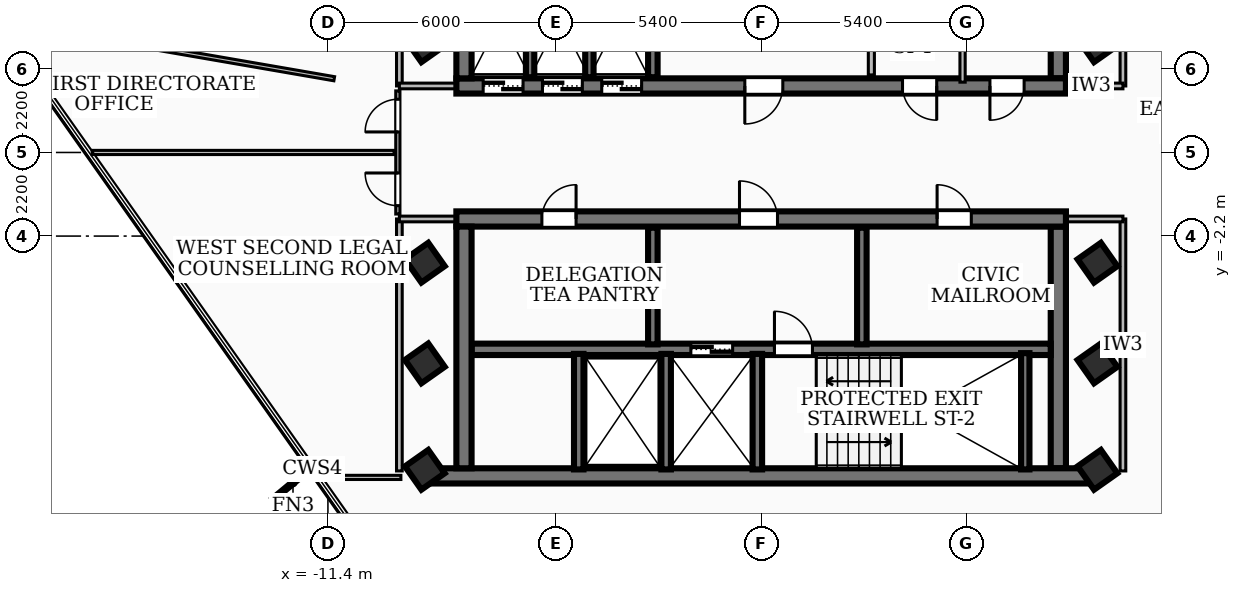
"""IFC4 building model, lengths in metres.
Left out: names, types, materials, properties, quantities, classifications, styles, units other than length and angle.
Written with IfcOpenShell. Run it as: python <this file> out.ifc"""

import sys

from ifc_helpers import new_model, si_unit, direction, frame, frame_2d, origin, origin_2d, place, context, subcontext, project, spatial, rectangle, extrude, element, fill, save


model = new_model("IFC4")
c1 = context("Model", 3, precision=1e-05, world=origin(), true_north=direction((0.0, 1.0)))
c2 = subcontext(c1, "Body", "Model", "MODEL_VIEW")
j1 = project(units=[si_unit("LENGTHUNIT", "METRE"), si_unit("PLANEANGLEUNIT", "RADIAN")], contexts=[c1])
p1 = place(None, origin())
s1 = spatial("IfcSite", under=j1, at=p1, CompositionType="ELEMENT")
p2 = place(p1, origin())
s2 = spatial("IfcBuilding", under=s1, at=p2, CompositionType="ELEMENT")
p3 = place(p2, frame((0.0, 0.0, 222.3)))
s3 = spatial("IfcBuildingStorey", under=s2, at=p3, CompositionType="ELEMENT", Elevation=222.3)
p4 = place(p3, frame((8.02, 1.75, 0.0), z_axis=(0.0, 0.0, 1.0), x_axis=(-1.0, 0.0, 0.0)))
e1 = element("IfcWall", 1, at=p4, inside=s3, PredefinedType="SHEAR", context=c2, shape_type="SweptSolid", body=[
    extrude(rectangle(XDim=16.04, YDim=0.4, at=frame_2d((8.02, 0.0))), origin(), (0.0, 0.0, 1.0), 3.14),
])
p5 = place(p4, frame((7.45, 0.0, 0.0)))
e2 = element("IfcOpeningElement", 2, at=p5, cuts=e1, PredefinedType="OPENING", context=c2, shape_type="SweptSolid", body=[
    extrude(rectangle(XDim=1.0, YDim=2.1, at=frame_2d((0.5, 1.05))), frame((0.0, 0.21, 0.0), z_axis=(0.0, -1.0, 0.0), x_axis=(1.0, 0.0, 0.0)), (0.0, 0.0, 1.0), 0.42),
])
p6 = place(p4, frame((14.285, 0.0, 0.0)))
e3 = element("IfcOpeningElement", 3, at=p6, cuts=e1, PredefinedType="OPENING", context=c2, shape_type="SweptSolid", body=[
    extrude(rectangle(XDim=1.05, YDim=2.15, at=frame_2d((0.525, 1.075))), frame((0.0, 0.21, 0.0), z_axis=(0.0, -1.0, 0.0), x_axis=(1.0, 0.0, 0.0)), (0.0, 0.0, 1.0), 0.42),
])
p7 = place(p4, frame((12.725, 0.0, 0.0)))
e4 = element("IfcOpeningElement", 4, at=p7, cuts=e1, PredefinedType="OPENING", context=c2, shape_type="SweptSolid", body=[
    extrude(rectangle(XDim=1.05, YDim=2.15, at=frame_2d((0.525, 1.075))), frame((0.0, 0.21, 0.0), z_axis=(0.0, -1.0, 0.0), x_axis=(1.0, 0.0, 0.0)), (0.0, 0.0, 1.0), 0.42),
])
p8 = place(p4, frame((11.165, 0.0, 0.0)))
e5 = element("IfcOpeningElement", 5, at=p8, cuts=e1, PredefinedType="OPENING", context=c2, shape_type="SweptSolid", body=[
    extrude(rectangle(XDim=1.05, YDim=2.15, at=frame_2d((0.525, 1.075))), frame((0.0, 0.21, 0.0), z_axis=(0.0, -1.0, 0.0), x_axis=(1.0, 0.0, 0.0)), (0.0, 0.0, 1.0), 0.42),
])
p9 = place(p4, frame((3.4, 0.0, 0.0)))
e6 = element("IfcOpeningElement", 6, at=p9, cuts=e1, PredefinedType="OPENING", context=c2, shape_type="SweptSolid", body=[
    extrude(rectangle(XDim=0.9, YDim=2.06, at=frame_2d((0.45, 1.03))), frame((0.0, 0.21, 0.0), z_axis=(0.0, -1.0, 0.0), x_axis=(1.0, 0.0, 0.0)), (0.0, 0.0, 1.0), 0.42),
])
p10 = place(p4, frame((1.1, 0.0, 0.0)))
e7 = element("IfcOpeningElement", 7, at=p10, cuts=e1, PredefinedType="OPENING", context=c2, shape_type="SweptSolid", body=[
    extrude(rectangle(XDim=0.9, YDim=2.06, at=frame_2d((0.45, 1.03))), frame((0.0, 0.21, 0.0), z_axis=(0.0, -1.0, 0.0), x_axis=(1.0, 0.0, 0.0)), (0.0, 0.0, 1.0), 0.42),
])
for number, where, z_axis, x_axis in (
    (8, (-7.82, 1.95, 0.0), (0.0, 0.0, 1.0), (0.0, 1.0, 0.0)),
    (9, (7.82, 8.31, 0.0), (0.0, 0.0, 1.0), (0.0, -1.0, 0.0)),
):
    element("IfcWall", number, at=place(p3, frame(where, z_axis=z_axis, x_axis=x_axis)), inside=s3, PredefinedType="SHEAR", context=c2, shape_type="SweptSolid", body=[
        extrude(rectangle(XDim=6.36, YDim=0.4, at=frame_2d((3.18, 0.0))), origin(), (0.0, 0.0, 1.0), 3.14),
    ])
p11 = place(p3, frame((8.78, -8.51, 0.0), z_axis=(0.0, 0.0, 1.0), x_axis=(-1.0, 0.0, 0.0)))
e10 = element("IfcWall", 10, at=p11, inside=s3, PredefinedType="SHEAR", context=c2, shape_type="SweptSolid", body=[
    extrude(rectangle(XDim=17.56, YDim=0.4, at=frame_2d((8.78, 0.0))), origin(), (0.0, 0.0, 1.0), 3.14),
])
p12 = place(p3, frame((-8.02, -1.75, 0.0), z_axis=(0.0, 0.0, 1.0), x_axis=(1.0, 0.0, 0.0)))
e11 = element("IfcWall", 11, at=p12, inside=s3, PredefinedType="SHEAR", context=c2, shape_type="SweptSolid", body=[
    extrude(rectangle(XDim=16.04, YDim=0.4, at=frame_2d((8.02, 0.0))), origin(), (0.0, 0.0, 1.0), 3.14),
])
p13 = place(p12, frame((7.45, 0.0, 0.0)))
e12 = element("IfcOpeningElement", 12, at=p13, cuts=e11, PredefinedType="OPENING", context=c2, shape_type="SweptSolid", body=[
    extrude(rectangle(XDim=1.0, YDim=2.1, at=frame_2d((0.5, 1.05))), frame((0.0, 0.21, 0.0), z_axis=(0.0, -1.0, 0.0), x_axis=(1.0, 0.0, 0.0)), (0.0, 0.0, 1.0), 0.42),
])
p14 = place(p12, frame((12.65, 0.0, 0.0)))
e13 = element("IfcOpeningElement", 13, at=p14, cuts=e11, PredefinedType="OPENING", context=c2, shape_type="SweptSolid", body=[
    extrude(rectangle(XDim=0.9, YDim=2.06, at=frame_2d((0.45, 1.03))), frame((0.0, 0.21, 0.0), z_axis=(0.0, -1.0, 0.0), x_axis=(1.0, 0.0, 0.0)), (0.0, 0.0, 1.0), 0.42),
])
p15 = place(p12, frame((2.25, 0.0, 0.0)))
e14 = element("IfcOpeningElement", 14, at=p15, cuts=e11, PredefinedType="OPENING", context=c2, shape_type="SweptSolid", body=[
    extrude(rectangle(XDim=0.9, YDim=2.06, at=frame_2d((0.45, 1.03))), frame((0.0, 0.21, 0.0), z_axis=(0.0, -1.0, 0.0), x_axis=(1.0, 0.0, 0.0)), (0.0, 0.0, 1.0), 0.42),
])
for number, where, z_axis, x_axis in (
    (15, (-7.82, -8.31, 0.0), (0.0, 0.0, 1.0), (0.0, 1.0, 0.0)),
    (16, (7.82, -1.95, 0.0), (0.0, 0.0, 1.0), (0.0, -1.0, 0.0)),
):
    element("IfcWall", number, at=place(p3, frame(where, z_axis=z_axis, x_axis=x_axis)), inside=s3, PredefinedType="SHEAR", context=c2, shape_type="SweptSolid", body=[
        extrude(rectangle(XDim=6.36, YDim=0.4, at=frame_2d((3.18, 0.0))), origin(), (0.0, 0.0, 1.0), 3.14),
    ])
p16 = place(p3, frame((-7.62, -5.18, 0.0), z_axis=(0.0, 0.0, 1.0), x_axis=(1.0, 0.0, 0.0)))
e17 = element("IfcWall", 17, at=p16, inside=s3, PredefinedType="SOLIDWALL", context=c2, shape_type="SweptSolid", body=[
    extrude(rectangle(XDim=15.24, YDim=0.3, at=frame_2d((7.62, 0.0))), origin(), (0.0, 0.0, 1.0), 3.14),
])
p17 = place(p16, frame((5.77, 0.0, 0.0)))
e18 = element("IfcOpeningElement", 18, at=p17, cuts=e17, PredefinedType="OPENING", context=c2, shape_type="SweptSolid", body=[
    extrude(rectangle(XDim=1.1, YDim=2.15, at=frame_2d((0.55, 1.075))), frame((0.0, 0.16, 0.0), z_axis=(0.0, -1.0, 0.0), x_axis=(1.0, 0.0, 0.0)), (0.0, 0.0, 1.0), 0.32),
])
p18 = place(p16, frame((7.97, 0.0, 0.0)))
e19 = element("IfcOpeningElement", 19, at=p18, cuts=e17, PredefinedType="OPENING", context=c2, shape_type="SweptSolid", body=[
    extrude(rectangle(XDim=1.0, YDim=2.1, at=frame_2d((0.5, 1.05))), frame((0.0, 0.16, 0.0), z_axis=(0.0, -1.0, 0.0), x_axis=(1.0, 0.0, 0.0)), (0.0, 0.0, 1.0), 0.32),
])
p19 = place(p3, frame((6.95, -8.34, 0.0), z_axis=(0.0, 0.0, 1.0), x_axis=(0.0, 1.0, 0.0)))
e20 = element("IfcWall", 20, at=p19, inside=s3, PredefinedType="SOLIDWALL", context=c2, shape_type="SweptSolid", body=[
    extrude(rectangle(XDim=3.06, YDim=0.22, at=frame_2d((1.53, 0.0))), origin(), (0.0, 0.0, 1.0), 3.14),
])
p20 = place(p3, frame((-2.85, 1.98, 0.0), z_axis=(0.0, 0.0, 1.0), x_axis=(0.0, 1.0, 0.0)))
e21 = element("IfcWall", 21, at=p20, inside=s3, PredefinedType="SOLIDWALL", context=c2, shape_type="SweptSolid", body=[
    extrude(rectangle(XDim=3.07, YDim=0.25, at=frame_2d((1.535, 0.0))), origin(), (0.0, 0.0, 1.0), 3.14),
])
for number, where, z_axis, x_axis in (
    (22, (-0.1, -8.34, 0.0), (0.0, 0.0, 1.0), (0.0, 1.0, 0.0)),
    (23, (-2.5, -8.34, 0.0), (0.0, 0.0, 1.0), (0.0, 1.0, 0.0)),
    (24, (-4.8, -8.34, 0.0), (0.0, 0.0, 1.0), (0.0, 1.0, 0.0)),
):
    element("IfcWall", number, at=place(p3, frame(where, z_axis=z_axis, x_axis=x_axis)), inside=s3, PredefinedType="SOLIDWALL", context=c2, shape_type="SweptSolid", body=[
        extrude(rectangle(XDim=3.04, YDim=0.25, at=frame_2d((1.52, 0.0))), origin(), (0.0, 0.0, 1.0), 3.14),
    ])
for number, where, z_axis, x_axis in (
    (25, (-2.85, -5.05, 0.0), (0.0, 0.0, 1.0), (0.0, 1.0, 0.0)),
    (26, (2.65, -5.05, 0.0), (0.0, 0.0, 1.0), (0.0, 1.0, 0.0)),
):
    element("IfcWall", number, at=place(p3, frame(where, z_axis=z_axis, x_axis=x_axis)), inside=s3, PredefinedType="SOLIDWALL", context=c2, shape_type="SweptSolid", body=[
        extrude(rectangle(XDim=3.07, YDim=0.25, at=frame_2d((1.535, 0.0))), origin(), (0.0, 0.0, 1.0), 3.14),
    ])
for number, where, z_axis, x_axis in (
    (27, (-6.08, 1.98, 0.0), (0.0, 0.0, 1.0), (0.0, 1.0, 0.0)),
    (28, (-4.52, 1.98, 0.0), (0.0, 0.0, 1.0), (0.0, 1.0, 0.0)),
):
    element("IfcWall", number, at=place(p3, frame(where, z_axis=z_axis, x_axis=x_axis)), inside=s3, PredefinedType="SOLIDWALL", context=c2, shape_type="SweptSolid", body=[
        extrude(rectangle(XDim=3.07, YDim=0.22, at=frame_2d((1.535, 0.0))), origin(), (0.0, 0.0, 1.0), 3.14),
    ])
for number, where, z_axis, x_axis in (
    (29, (-8.85, -5.55, 0.0), (0.0, 0.0, 1.0), (0.817, 0.576, 0.0)),
    (30, (-8.85, -2.9, 0.0), (0.0, 0.0, 1.0), (0.817, 0.576, 0.0)),
    (31, (-8.85, 2.9, 0.0), (0.0, 0.0, 1.0), (0.817, 0.576, 0.0)),
    (32, (8.85, -5.55, 0.0), (0.0, 0.0, 1.0), (0.817, 0.576, 0.0)),
    (33, (8.85, -2.9, 0.0), (0.0, 0.0, 1.0), (0.817, 0.576, 0.0)),
    (34, (8.85, 2.9, 0.0), (0.0, 0.0, 1.0), (0.817, 0.576, 0.0)),
    (35, (8.85, -8.35, 0.0), (0.0, 0.0, 1.0), (0.817, 0.576, 0.0)),
    (36, (-8.85, -8.35, 0.0), (0.0, 0.0, 1.0), (0.817, 0.576, 0.0)),
):
    element("IfcColumn", number, at=place(p3, frame(where, z_axis=z_axis, x_axis=x_axis)), inside=s3, PredefinedType="COLUMN", context=c2, shape_type="SweptSolid", body=[
        extrude(rectangle(XDim=0.75, YDim=0.75, at=origin_2d()), origin(), (0.0, 0.0, 1.0), 3.42),
    ])
p21 = place(p3, frame((2.9, 2.04, 0.0), z_axis=(0.0, 0.0, 1.0), x_axis=(0.0, 1.0, 0.0)))
e37 = element("IfcWall", 37, at=p21, inside=s3, PredefinedType="PARTITIONING", context=c2, shape_type="SweptSolid", body=[
    extrude(rectangle(XDim=2.94, YDim=0.16, at=frame_2d((1.47, 0.0))), origin(), (0.0, 0.0, 1.0), 2.37),
])
p22 = place(p21, frame((1.82, 0.0, 0.0)))
e38 = element("IfcOpeningElement", 38, at=p22, cuts=e37, PredefinedType="OPENING", context=c2, shape_type="SweptSolid", body=[
    extrude(rectangle(XDim=0.9, YDim=2.06, at=frame_2d((0.45, 1.03))), frame((0.0, 0.09, 0.0), z_axis=(0.0, -1.0, 0.0), x_axis=(1.0, 0.0, 0.0)), (0.0, 0.0, 1.0), 0.18),
])
p23 = place(p3, frame((5.3, 1.85, 0.0), z_axis=(0.0, 0.0, 1.0), x_axis=(0.0, 1.0, 0.0)))
e39 = element("IfcWall", 39, at=p23, inside=s3, PredefinedType="PARTITIONING", context=c2, shape_type="SweptSolid", body=[
    extrude(rectangle(XDim=1.89, YDim=0.138, at=frame_2d((0.945, 0.0))), origin(), (0.0, 0.0, 1.0), 2.37),
])
p24 = place(p3, frame((-9.52, 1.75, 0.0), z_axis=(0.0, 0.0, 1.0), x_axis=(0.0, 1.0, 0.0)))
e40 = element("IfcWall", 40, at=p24, inside=s3, PredefinedType="PARTITIONING", context=c2, shape_type="SweptSolid", body=[
    extrude(rectangle(XDim=6.63, YDim=0.15, at=frame_2d((3.315, 0.0))), origin(), (0.0, 0.0, 1.0), 3.14),
])
p25 = place(p3, frame((-7.85, 1.75, 0.0), z_axis=(0.0, 0.0, 1.0), x_axis=(-1.0, 0.0, 0.0)))
e41 = element("IfcWall", 41, at=p25, inside=s3, PredefinedType="PARTITIONING", context=c2, shape_type="SweptSolid", body=[
    extrude(rectangle(XDim=1.67, YDim=0.15, at=frame_2d((0.835, 0.0))), origin(), (0.0, 0.0, 1.0), 2.37),
])
p26 = place(p3, frame((-9.52, -8.38, 0.0), z_axis=(0.0, 0.0, 1.0), x_axis=(0.0, 1.0, 0.0)))
e42 = element("IfcWall", 42, at=p26, inside=s3, PredefinedType="PARTITIONING", context=c2, shape_type="SweptSolid", body=[
    extrude(rectangle(XDim=6.63, YDim=0.15, at=frame_2d((3.315, 0.0))), origin(), (0.0, 0.0, 1.0), 3.14),
])
p27 = place(p3, frame((-7.85, -1.75, 0.0), z_axis=(0.0, 0.0, 1.0), x_axis=(-1.0, 0.0, 0.0)))
e43 = element("IfcWall", 43, at=p27, inside=s3, PredefinedType="PARTITIONING", context=c2, shape_type="SweptSolid", body=[
    extrude(rectangle(XDim=1.67, YDim=0.15, at=frame_2d((0.835, 0.0))), origin(), (0.0, 0.0, 1.0), 2.37),
])
p28 = place(p3, frame((9.52, 1.75, 0.0), z_axis=(0.0, 0.0, 1.0), x_axis=(0.0, 1.0, 0.0)))
e44 = element("IfcWall", 44, at=p28, inside=s3, PredefinedType="PARTITIONING", context=c2, shape_type="SweptSolid", body=[
    extrude(rectangle(XDim=6.63, YDim=0.15, at=frame_2d((3.315, 0.0))), origin(), (0.0, 0.0, 1.0), 2.51),
])
p29 = place(p3, frame((7.85, 1.75, 0.0), z_axis=(0.0, 0.0, 1.0), x_axis=(1.0, 0.0, 0.0)))
e45 = element("IfcWall", 45, at=p29, inside=s3, PredefinedType="PARTITIONING", context=c2, shape_type="SweptSolid", body=[
    extrude(rectangle(XDim=1.67, YDim=0.15, at=frame_2d((0.835, 0.0))), origin(), (0.0, 0.0, 1.0), 2.37),
])
p30 = place(p3, frame((9.52, -8.38, 0.0), z_axis=(0.0, 0.0, 1.0), x_axis=(0.0, 1.0, 0.0)))
e46 = element("IfcWall", 46, at=p30, inside=s3, PredefinedType="PARTITIONING", context=c2, shape_type="SweptSolid", body=[
    extrude(rectangle(XDim=6.63, YDim=0.15, at=frame_2d((3.315, 0.0))), origin(), (0.0, 0.0, 1.0), 3.14),
])
p31 = place(p3, frame((7.85, -1.75, 0.0), z_axis=(0.0, 0.0, 1.0), x_axis=(1.0, 0.0, 0.0)))
e47 = element("IfcWall", 47, at=p31, inside=s3, PredefinedType="PARTITIONING", context=c2, shape_type="SweptSolid", body=[
    extrude(rectangle(XDim=1.67, YDim=0.15, at=frame_2d((0.835, 0.0))), origin(), (0.0, 0.0, 1.0), 2.37),
])
p32 = place(p3, frame((-17.604, 0.0, 0.0), z_axis=(0.0, 0.0, 1.0), x_axis=(1.0, 0.0, 0.0)))
e48 = element("IfcWall", 48, at=p32, inside=s3, PredefinedType="PARTITIONING", context=c2, shape_type="SweptSolid", body=[
    extrude(rectangle(XDim=7.944, YDim=0.11, at=frame_2d((3.972, 0.0))), origin(), (0.0, 0.0, 1.0), 3.14),
])
p33 = place(p3, frame((-11.573, -8.55, 0.0), z_axis=(0.0, 0.0, 1.0), x_axis=(1.0, 0.0, 0.0)))
e49 = element("IfcWall", 49, at=p33, inside=s3, PredefinedType="PARTITIONING", context=c2, shape_type="SweptSolid", body=[
    extrude(rectangle(XDim=2.093, YDim=0.11, at=frame_2d((1.046, 0.0))), origin(), (0.0, 0.0, 1.0), 3.14),
])
p34 = place(p3, frame((-9.56, -1.62, 0.0), z_axis=(0.0, 0.0, 1.0), x_axis=(0.0, 1.0, 0.0)))
e50 = element("IfcWall", 50, at=p34, inside=s3, PredefinedType="PARTITIONING", context=c2, shape_type="SweptSolid", body=[
    extrude(rectangle(XDim=3.24, YDim=0.11, at=frame_2d((1.62, 0.0))), origin(), (0.0, 0.0, 1.0), 3.14),
])
p35 = place(p34, frame((0.22, 0.0, 0.0)))
e51 = element("IfcOpeningElement", 51, at=p35, cuts=e50, PredefinedType="OPENING", context=c2, shape_type="SweptSolid", body=[
    extrude(rectangle(XDim=0.86, YDim=2.04, at=frame_2d((0.43, 1.02))), frame((0.0, 0.065, 0.0), z_axis=(0.0, -1.0, 0.0), x_axis=(1.0, 0.0, 0.0)), (0.0, 0.0, 1.0), 0.13),
])
p36 = place(p34, frame((2.16, 0.0, 0.0)))
e52 = element("IfcOpeningElement", 52, at=p36, cuts=e50, PredefinedType="OPENING", context=c2, shape_type="SweptSolid", body=[
    extrude(rectangle(XDim=0.86, YDim=2.04, at=frame_2d((0.43, 1.02))), frame((0.0, 0.065, 0.0), z_axis=(0.0, -1.0, 0.0), x_axis=(1.0, 0.0, 0.0)), (0.0, 0.0, 1.0), 0.13),
])
p37 = place(p3, frame((-11.234, 1.94, 0.0), z_axis=(0.0, 0.0, 1.0), x_axis=(-0.985400402951, 0.170252887973, 0.0)))
e53 = element("IfcWall", 53, at=p37, inside=s3, PredefinedType="PARTITIONING", context=c2, shape_type="SweptSolid", body=[
    extrude(rectangle(XDim=8.294, YDim=0.11, at=frame_2d((4.147, 0.0))), origin(), (0.0, 0.0, 1.0), 3.14),
])
p38 = place(p3, frame((16.752, -5.671, 0.0), z_axis=(0.0, 0.0, 1.0), x_axis=(-0.81715881447, -0.576412588285, 0.0)))
e54 = element("IfcWall", 54, at=p38, inside=s3, PredefinedType="PARTITIONING", context=c2, shape_type="SweptSolid", body=[
    extrude(rectangle(XDim=20.44, YDim=0.11, at=frame_2d((10.22, 0.0))), origin(), (0.0, 0.0, 1.0), 2.51),
])
p39 = place(p38, frame((9.82, 0.0, 0.0)))
e55 = element("IfcOpeningElement", 55, at=p39, cuts=e54, PredefinedType="OPENING", context=c2, shape_type="SweptSolid", body=[
    extrude(rectangle(XDim=1.2, YDim=2.1, at=frame_2d((0.6, 1.05))), frame((0.0, 0.065, 0.0), z_axis=(0.0, -1.0, 0.0), x_axis=(1.0, 0.0, 0.0)), (0.0, 0.0, 1.0), 0.13),
])
p40 = place(p3, frame((3.766, -16.85, 0.0), z_axis=(0.0, 0.0, 1.0), x_axis=(0.817131323803, 0.576451558815, 0.0)))
e56 = element("IfcWall", 56, at=p40, inside=s3, PredefinedType="PARTITIONING", context=c2, shape_type="SweptSolid", body=[
    extrude(rectangle(XDim=12.87, YDim=0.11, at=frame_2d((6.435, 0.0))), origin(), (0.0, 0.0, 1.0), 2.51),
])
p41 = place(p40, frame((6.185, 0.0, 0.0)))
e57 = element("IfcOpeningElement", 57, at=p41, cuts=e56, PredefinedType="OPENING", context=c2, shape_type="SweptSolid", body=[
    extrude(rectangle(XDim=0.86, YDim=2.04, at=frame_2d((0.43, 1.02))), frame((0.0, 0.065, 0.0), z_axis=(0.0, -1.0, 0.0), x_axis=(1.0, 0.0, 0.0)), (0.0, 0.0, 1.0), 0.13),
])
p42 = place(p40, frame((7.625, 0.0, 0.0)))
e58 = element("IfcOpeningElement", 58, at=p42, cuts=e56, PredefinedType="OPENING", context=c2, shape_type="SweptSolid", body=[
    extrude(rectangle(XDim=0.86, YDim=2.04, at=frame_2d((0.43, 1.02))), frame((0.0, 0.065, 0.0), z_axis=(0.0, -1.0, 0.0), x_axis=(1.0, 0.0, 0.0)), (0.0, 0.0, 1.0), 0.13),
])
p43 = place(p5, origin())
e59 = element("IfcDoor", 59, at=p43, inside=s3, OperationType="SINGLE_SWING_RIGHT", PredefinedType="DOOR", context=c2, shape_type="SweptSolid", body=[
    extrude(rectangle(XDim=1.0, YDim=2.1, at=frame_2d((0.5, 1.05))), frame((0.0, 0.025, 0.0), z_axis=(0.0, -1.0, 0.0), x_axis=(1.0, 0.0, 0.0)), (0.0, 0.0, 1.0), 0.05),
])
fill(e2, e59)
p44 = place(p13, origin())
e60 = element("IfcDoor", 60, at=p44, inside=s3, OperationType="SINGLE_SWING_LEFT", PredefinedType="DOOR", context=c2, shape_type="SweptSolid", body=[
    extrude(rectangle(XDim=1.0, YDim=2.1, at=frame_2d((0.5, 1.05))), frame((0.0, 0.025, 0.0), z_axis=(0.0, -1.0, 0.0), x_axis=(1.0, 0.0, 0.0)), (0.0, 0.0, 1.0), 0.05),
])
fill(e12, e60)
p45 = place(p17, origin())
e61 = element("IfcDoor", 61, at=p45, inside=s3, OperationType="DOUBLE_DOOR_SLIDING", PredefinedType="DOOR", context=c2, shape_type="SweptSolid", body=[
    extrude(rectangle(XDim=1.1, YDim=2.15, at=frame_2d((0.55, 1.075))), frame((0.0, 0.025, 0.0), z_axis=(0.0, -1.0, 0.0), x_axis=(1.0, 0.0, 0.0)), (0.0, 0.0, 1.0), 0.05),
])
fill(e18, e61)
p46 = place(p18, origin())
e62 = element("IfcDoor", 62, at=p46, inside=s3, OperationType="SINGLE_SWING_LEFT", PredefinedType="DOOR", context=c2, shape_type="SweptSolid", body=[
    extrude(rectangle(XDim=1.0, YDim=2.1, at=frame_2d((0.5, 1.05))), frame((0.0, 0.025, 0.0), z_axis=(0.0, -1.0, 0.0), x_axis=(1.0, 0.0, 0.0)), (0.0, 0.0, 1.0), 0.05),
])
fill(e19, e62)
p47 = place(p6, origin())
e63 = element("IfcDoor", 63, at=p47, inside=s3, OperationType="DOUBLE_DOOR_SLIDING", PredefinedType="DOOR", context=c2, shape_type="SweptSolid", body=[
    extrude(rectangle(XDim=1.05, YDim=2.15, at=frame_2d((0.525, 1.075))), frame((0.0, 0.025, 0.0), z_axis=(0.0, -1.0, 0.0), x_axis=(1.0, 0.0, 0.0)), (0.0, 0.0, 1.0), 0.05),
])
fill(e3, e63)
p48 = place(p7, origin())
e64 = element("IfcDoor", 64, at=p48, inside=s3, OperationType="DOUBLE_DOOR_SLIDING", PredefinedType="DOOR", context=c2, shape_type="SweptSolid", body=[
    extrude(rectangle(XDim=1.05, YDim=2.15, at=frame_2d((0.525, 1.075))), frame((0.0, 0.025, 0.0), z_axis=(0.0, -1.0, 0.0), x_axis=(1.0, 0.0, 0.0)), (0.0, 0.0, 1.0), 0.05),
])
fill(e4, e64)
p49 = place(p8, origin())
e65 = element("IfcDoor", 65, at=p49, inside=s3, OperationType="DOUBLE_DOOR_SLIDING", PredefinedType="DOOR", context=c2, shape_type="SweptSolid", body=[
    extrude(rectangle(XDim=1.05, YDim=2.15, at=frame_2d((0.525, 1.075))), frame((0.0, 0.025, 0.0), z_axis=(0.0, -1.0, 0.0), x_axis=(1.0, 0.0, 0.0)), (0.0, 0.0, 1.0), 0.05),
])
fill(e5, e65)
p50 = place(p14, origin())
e66 = element("IfcDoor", 66, at=p50, inside=s3, OperationType="SINGLE_SWING_LEFT", PredefinedType="DOOR", context=c2, shape_type="SweptSolid", body=[
    extrude(rectangle(XDim=0.9, YDim=2.06, at=frame_2d((0.45, 1.03))), frame((0.0, 0.025, 0.0), z_axis=(0.0, -1.0, 0.0), x_axis=(1.0, 0.0, 0.0)), (0.0, 0.0, 1.0), 0.05),
])
fill(e13, e66)
p51 = place(p15, origin())
e67 = element("IfcDoor", 67, at=p51, inside=s3, OperationType="SINGLE_SWING_RIGHT", PredefinedType="DOOR", context=c2, shape_type="SweptSolid", body=[
    extrude(rectangle(XDim=0.9, YDim=2.06, at=frame_2d((0.45, 1.03))), frame((0.0, 0.025, 0.0), z_axis=(0.0, -1.0, 0.0), x_axis=(1.0, 0.0, 0.0)), (0.0, 0.0, 1.0), 0.05),
])
fill(e14, e67)
p52 = place(p9, origin())
e68 = element("IfcDoor", 68, at=p52, inside=s3, OperationType="SINGLE_SWING_LEFT", PredefinedType="DOOR", context=c2, shape_type="SweptSolid", body=[
    extrude(rectangle(XDim=0.9, YDim=2.06, at=frame_2d((0.45, 1.03))), frame((0.0, 0.025, 0.0), z_axis=(0.0, -1.0, 0.0), x_axis=(1.0, 0.0, 0.0)), (0.0, 0.0, 1.0), 0.05),
])
fill(e6, e68)
p53 = place(p10, origin())
e69 = element("IfcDoor", 69, at=p53, inside=s3, OperationType="SINGLE_SWING_RIGHT", PredefinedType="DOOR", context=c2, shape_type="SweptSolid", body=[
    extrude(rectangle(XDim=0.9, YDim=2.06, at=frame_2d((0.45, 1.03))), frame((0.0, 0.025, 0.0), z_axis=(0.0, -1.0, 0.0), x_axis=(1.0, 0.0, 0.0)), (0.0, 0.0, 1.0), 0.05),
])
fill(e7, e69)
p54 = place(p35, origin())
e70 = element("IfcDoor", 70, at=p54, inside=s3, OperationType="SINGLE_SWING_RIGHT", PredefinedType="DOOR", context=c2, shape_type="SweptSolid", body=[
    extrude(rectangle(XDim=0.86, YDim=2.04, at=frame_2d((0.43, 1.02))), frame((0.0, 0.025, 0.0), z_axis=(0.0, -1.0, 0.0), x_axis=(1.0, 0.0, 0.0)), (0.0, 0.0, 1.0), 0.05),
])
fill(e51, e70)
p55 = place(p36, origin())
e71 = element("IfcDoor", 71, at=p55, inside=s3, OperationType="SINGLE_SWING_LEFT", PredefinedType="DOOR", context=c2, shape_type="SweptSolid", body=[
    extrude(rectangle(XDim=0.86, YDim=2.04, at=frame_2d((0.43, 1.02))), frame((0.0, 0.025, 0.0), z_axis=(0.0, -1.0, 0.0), x_axis=(1.0, 0.0, 0.0)), (0.0, 0.0, 1.0), 0.05),
])
fill(e52, e71)
save(model, sys.argv[1])
